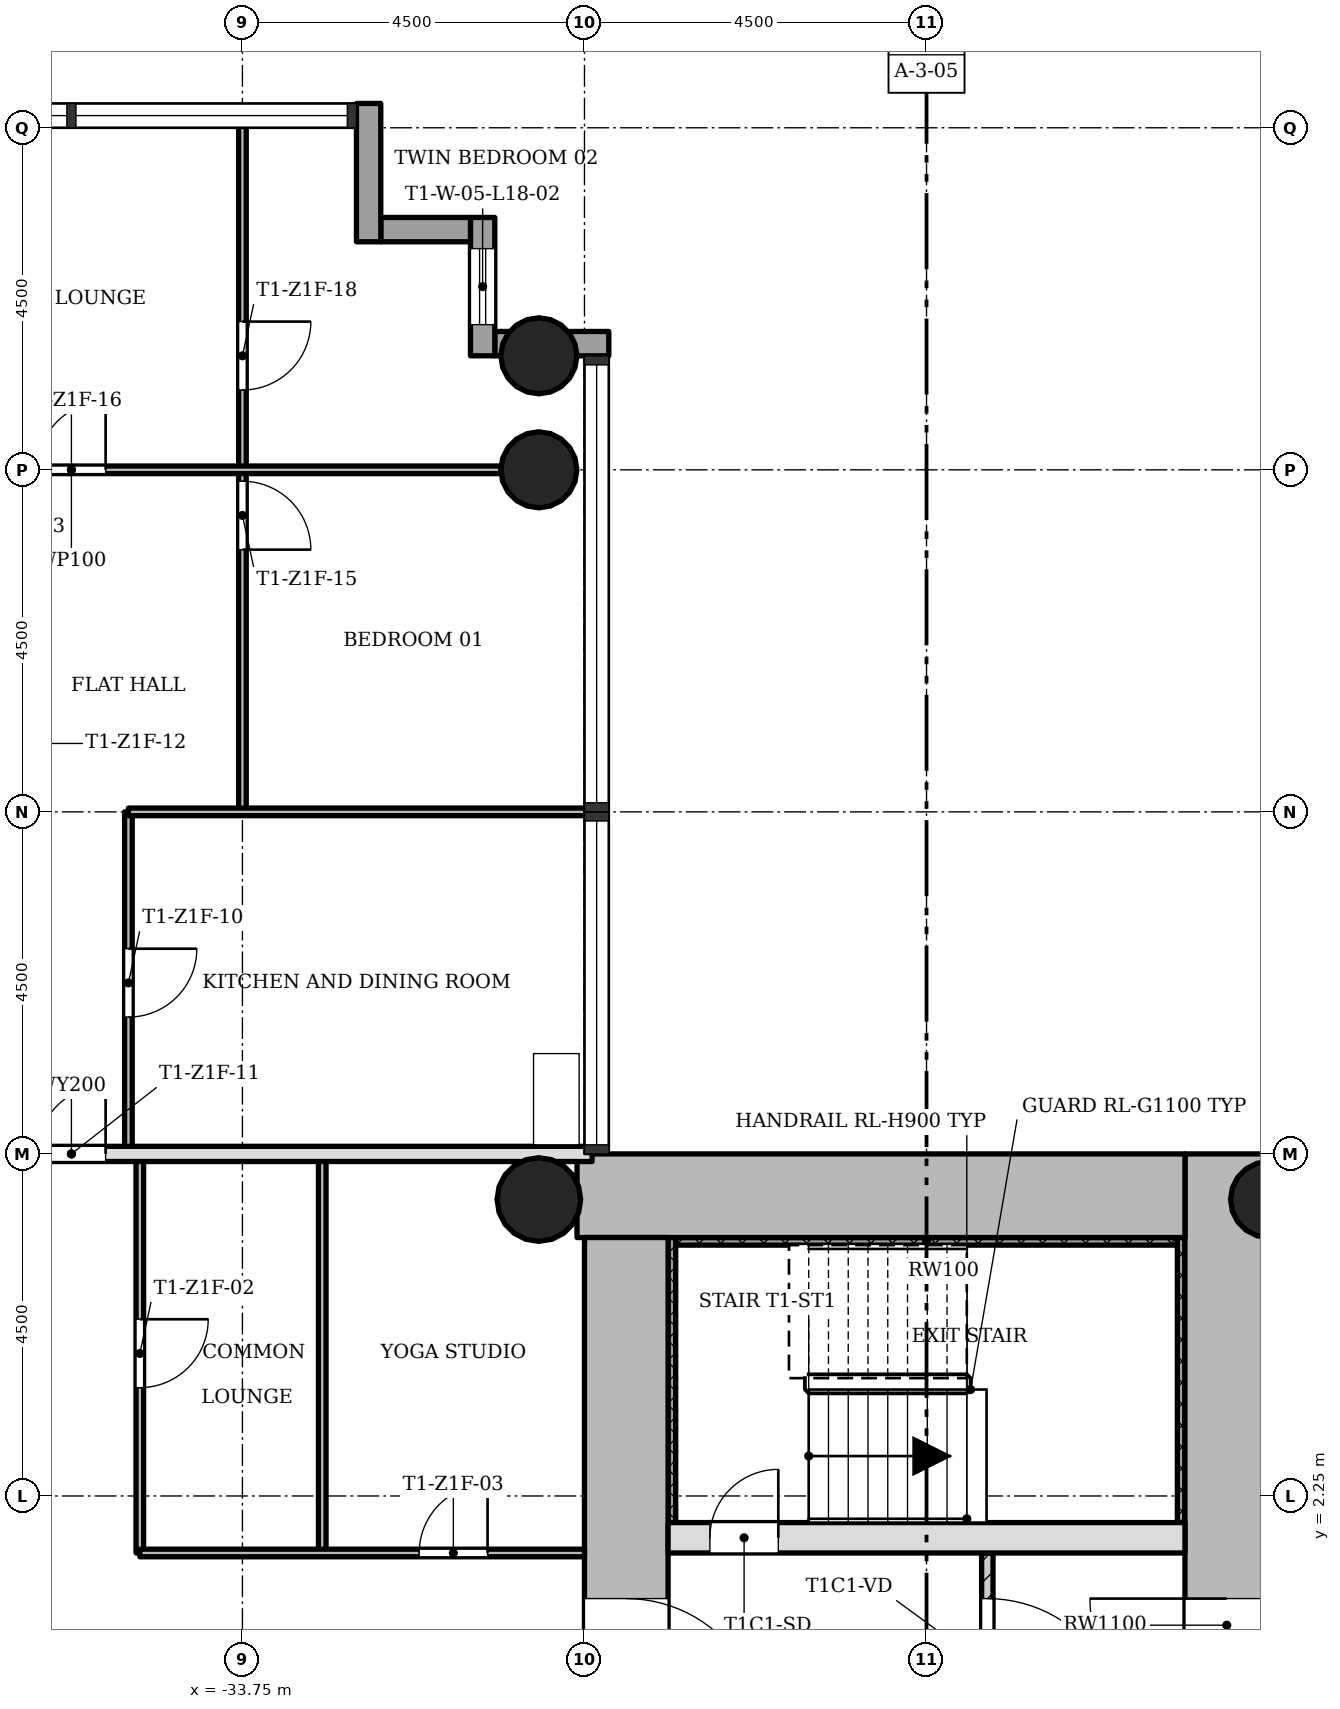
"""IFC4 building model, lengths in metres.
Left out: names, types, materials, properties, quantities, classifications, styles, units other than length and angle.
Written with IfcOpenShell. Run it as: python <this file> out.ifc"""

import sys

from ifc_helpers import new_model, si_unit, direction, frame, frame_2d, origin, origin_2d, place, context, subcontext, project, spatial, rectangle, hollow_circle, extrude, element, fill, save


model = new_model("IFC4")
c1 = context("Model", 3, precision=1e-05, world=origin(), true_north=direction((0.0, 1.0)))
c2 = subcontext(c1, "Body", "Model", "MODEL_VIEW")
j1 = project(units=[si_unit("LENGTHUNIT", "METRE"), si_unit("PLANEANGLEUNIT", "RADIAN")], contexts=[c1])
p1 = place(None, origin())
s1 = spatial("IfcSite", under=j1, at=p1, CompositionType="ELEMENT")
p2 = place(p1, origin())
s2 = spatial("IfcBuilding", under=s1, at=p2, CompositionType="ELEMENT")
p3 = place(p2, frame((0.0, 0.0, 68.7)))
s3 = spatial("IfcBuildingStorey", under=s2, at=p3, CompositionType="ELEMENT", Elevation=68.7)
p4 = place(p3, frame((-20.8, -5.65, 0.0), z_axis=(0.0, 0.0, 1.0), x_axis=(0.0, 1.0, 0.0)))
e1 = element("IfcWall", 1, at=p4, inside=s3, PredefinedType="SHEAR", context=c2, shape_type="SweptSolid", body=[
    extrude(rectangle(XDim=12.4, YDim=1.1, at=frame_2d((6.2, 0.0))), origin(), (0.0, 0.0, 1.0), 3.4),
])
p5 = place(p4, frame((4.75, 0.0, 0.0)))
e2 = element("IfcOpeningElement", 2, at=p5, cuts=e1, PredefinedType="OPENING", context=c2, shape_type="SweptSolid", body=[
    extrude(rectangle(XDim=1.8, YDim=2.1, at=frame_2d((0.9, 1.05))), frame((0.0, 0.56, 0.0), z_axis=(0.0, -1.0, 0.0), x_axis=(1.0, 0.0, 0.0)), (0.0, 0.0, 1.0), 1.12),
])
p6 = place(p3, frame((-21.35, 6.2, 0.0), z_axis=(0.0, 0.0, 1.0), x_axis=(-1.0, 0.0, 0.0)))
e3 = element("IfcWall", 3, at=p6, inside=s3, PredefinedType="SHEAR", context=c2, shape_type="SweptSolid", body=[
    extrude(rectangle(XDim=7.998, YDim=1.1, at=frame_2d((3.999, 0.0))), origin(), (0.0, 0.0, 1.0), 3.4),
])
p7 = place(p3, frame((-28.7, 5.65, 0.0), z_axis=(0.0, 0.0, 1.0), x_axis=(0.0, -1.0, 0.0)))
e4 = element("IfcWall", 4, at=p7, inside=s3, PredefinedType="SHEAR", context=c2, shape_type="SweptSolid", body=[
    extrude(rectangle(XDim=12.4, YDim=1.1, at=frame_2d((6.2, 0.0))), origin(), (0.0, 0.0, 1.0), 3.4),
])
p8 = place(p7, frame((4.75, 0.0, 0.0)))
e5 = element("IfcOpeningElement", 5, at=p8, cuts=e4, PredefinedType="OPENING", context=c2, shape_type="SweptSolid", body=[
    extrude(rectangle(XDim=1.8, YDim=2.1, at=frame_2d((0.9, 1.05))), frame((0.0, 0.56, 0.0), z_axis=(0.0, -1.0, 0.0), x_axis=(1.0, 0.0, 0.0)), (0.0, 0.0, 1.0), 1.12),
])
p9 = place(p3, frame((-28.15, 1.7, 0.0), z_axis=(0.0, 0.0, 1.0), x_axis=(1.0, 0.0, 0.0)))
e6 = element("IfcWall", 6, at=p9, inside=s3, PredefinedType="SHEAR", context=c2, shape_type="SweptSolid", body=[
    extrude(rectangle(XDim=6.8, YDim=0.4, at=frame_2d((3.4, 0.0))), origin(), (0.0, 0.0, 1.0), 3.4),
])
p10 = place(p9, frame((0.55, 0.0, 0.0)))
e7 = element("IfcOpeningElement", 7, at=p10, cuts=e6, PredefinedType="OPENING", context=c2, shape_type="SweptSolid", body=[
    extrude(rectangle(XDim=0.9, YDim=2.1, at=frame_2d((0.45, 1.05))), frame((0.0, 0.21, 0.0), z_axis=(0.0, -1.0, 0.0), x_axis=(1.0, 0.0, 0.0)), (0.0, 0.0, 1.0), 0.42),
])
for number, where, z_axis, x_axis in (
    (8, (-20.25, 6.15, 0.0), (0.0, 0.0, 1.0), (1.0, 0.0, 0.0)),
    (9, (-29.85, 15.75, 0.0), (0.0, 0.0, 1.0), (1.0, 0.0, 0.0)),
    (10, (-29.85, 17.25, 0.0), (0.0, 0.0, 1.0), (1.0, 0.0, 0.0)),
):
    element("IfcColumn", number, at=place(p3, frame(where, z_axis=z_axis, x_axis=x_axis)), inside=s3, PredefinedType="COLUMN", context=c2, shape_type="SweptSolid", body=[
        extrude(hollow_circle(Radius=0.5, WallThickness=0.036, at=origin_2d()), origin(), (0.0, 0.0, 1.0), 3.4),
    ])
p11 = place(p3, frame((-29.85, 6.15, 0.0), z_axis=(0.0, 0.0, 1.0), x_axis=(1.0, 0.0, 0.0)))
e11 = element("IfcColumn", 11, at=p11, inside=s3, PredefinedType="COLUMN", context=c2, shape_type="SweptSolid", body=[
    extrude(hollow_circle(Radius=0.55, WallThickness=0.04, at=origin_2d()), origin(), (0.0, 0.0, 1.0), 3.4),
])
p12 = place(p3, frame((-28.93, 17.41, -0.3), z_axis=(0.0, 0.0, 1.0), x_axis=(-1.0, 0.0, 0.0)))
e12 = element("IfcWall", 12, at=p12, inside=s3, PredefinedType="STANDARD", context=c2, shape_type="SweptSolid", body=[
    extrude(rectangle(XDim=1.5, YDim=0.32, at=frame_2d((0.75, 0.0))), origin(), (0.0, 0.0, 1.0), 3.4),
])
p13 = place(p3, frame((-30.59, 17.25, -0.3), z_axis=(0.0, 0.0, 1.0), x_axis=(0.0, 1.0, 0.0)))
e13 = element("IfcWall", 13, at=p13, inside=s3, PredefinedType="STANDARD", context=c2, shape_type="SweptSolid", body=[
    extrude(rectangle(XDim=1.82, YDim=0.32, at=frame_2d((0.91, 0.0))), origin(), (0.0, 0.0, 1.0), 3.4),
])
p14 = place(p13, frame((0.41, 0.0, 1.2)))
e14 = element("IfcOpeningElement", 14, at=p14, cuts=e13, PredefinedType="OPENING", context=c2, shape_type="SweptSolid", body=[
    extrude(rectangle(XDim=1.0, YDim=1.5, at=frame_2d((0.5, 0.75))), frame((0.0, 0.17, 0.0), z_axis=(0.0, -1.0, 0.0), x_axis=(1.0, 0.0, 0.0)), (0.0, 0.0, 1.0), 0.34),
])
p15 = place(p3, frame((-30.75, 18.91, -0.3), z_axis=(0.0, 0.0, 1.0), x_axis=(-1.0, 0.0, 0.0)))
e15 = element("IfcWall", 15, at=p15, inside=s3, PredefinedType="STANDARD", context=c2, shape_type="SweptSolid", body=[
    extrude(rectangle(XDim=1.18, YDim=0.32, at=frame_2d((0.59, 0.0))), origin(), (0.0, 0.0, 1.0), 3.4),
])
p16 = place(p3, frame((-32.09, 18.75, -0.3), z_axis=(0.0, 0.0, 1.0), x_axis=(0.0, 1.0, 0.0)))
e16 = element("IfcWall", 16, at=p16, inside=s3, PredefinedType="STANDARD", context=c2, shape_type="SweptSolid", body=[
    extrude(rectangle(XDim=1.82, YDim=0.32, at=frame_2d((0.91, 0.0))), origin(), (0.0, 0.0, 1.0), 3.4),
])
p17 = place(p3, frame((-23.95, -1.5, 0.0), z_axis=(0.0, 0.0, 1.0), x_axis=(0.0, 1.0, 0.0)))
e17 = element("IfcWall", 17, at=p17, inside=s3, PredefinedType="PARTITIONING", context=c2, shape_type="SweptSolid", body=[
    extrude(rectangle(XDim=3.0, YDim=0.15, at=frame_2d((1.5, 0.0))), origin(), (0.0, 0.0, 1.0), 3.0),
])
p18 = place(p17, frame((0.6, 0.0, 0.0)))
e18 = element("IfcOpeningElement", 18, at=p18, cuts=e17, PredefinedType="OPENING", context=c2, shape_type="SweptSolid", body=[
    extrude(rectangle(XDim=1.8, YDim=2.1, at=frame_2d((0.9, 1.05))), frame((0.0, 0.085, 0.0), z_axis=(0.0, -1.0, 0.0), x_axis=(1.0, 0.0, 0.0)), (0.0, 0.0, 1.0), 0.17),
])
p19 = place(p3, frame((-35.25, 6.75, 0.0), z_axis=(0.0, 0.0, 1.0), x_axis=(0.0, 1.0, 0.0)))
e19 = element("IfcWall", 19, at=p19, inside=s3, PredefinedType="PARTITIONING", context=c2, shape_type="SweptSolid", body=[
    extrude(rectangle(XDim=4.5, YDim=0.1, at=frame_2d((2.25, 0.0))), origin(), (0.0, 0.0, 1.0), 3.0),
])
p20 = place(p19, frame((1.8, 0.0, 0.0)))
e20 = element("IfcOpeningElement", 20, at=p20, cuts=e19, PredefinedType="OPENING", context=c2, shape_type="SweptSolid", body=[
    extrude(rectangle(XDim=0.9, YDim=2.1, at=frame_2d((0.45, 1.05))), frame((0.0, 0.06, 0.0), z_axis=(0.0, -1.0, 0.0), x_axis=(1.0, 0.0, 0.0)), (0.0, 0.0, 1.0), 0.12),
])
p21 = place(p3, frame((-35.1, 1.5, 0.0), z_axis=(0.0, 0.0, 1.0), x_axis=(0.0, 1.0, 0.0)))
e21 = element("IfcWall", 21, at=p21, inside=s3, PredefinedType="PARTITIONING", context=c2, shape_type="SweptSolid", body=[
    extrude(rectangle(XDim=5.25, YDim=0.1, at=frame_2d((2.625, 0.0))), origin(), (0.0, 0.0, 1.0), 3.0),
])
p22 = place(p21, frame((2.175, 0.0, 0.0)))
e22 = element("IfcOpeningElement", 22, at=p22, cuts=e21, PredefinedType="OPENING", context=c2, shape_type="SweptSolid", body=[
    extrude(rectangle(XDim=0.9, YDim=2.1, at=frame_2d((0.45, 1.05))), frame((0.0, 0.06, 0.0), z_axis=(0.0, -1.0, 0.0), x_axis=(1.0, 0.0, 0.0)), (0.0, 0.0, 1.0), 0.12),
])
p23 = place(p3, frame((-33.75, 11.25, 0.0), z_axis=(0.0, 0.0, 1.0), x_axis=(0.0, 1.0, 0.0)))
e23 = element("IfcWall", 23, at=p23, inside=s3, PredefinedType="PARTITIONING", context=c2, shape_type="SweptSolid", body=[
    extrude(rectangle(XDim=9.1, YDim=0.1, at=frame_2d((4.55, 0.0))), origin(), (0.0, 0.0, 1.0), 3.0),
])
p24 = place(p23, frame((3.45, 0.0, 0.0)))
e24 = element("IfcOpeningElement", 24, at=p24, cuts=e23, PredefinedType="OPENING", context=c2, shape_type="SweptSolid", body=[
    extrude(rectangle(XDim=0.9, YDim=2.1, at=frame_2d((0.45, 1.05))), frame((0.0, 0.06, 0.0), z_axis=(0.0, -1.0, 0.0), x_axis=(1.0, 0.0, 0.0)), (0.0, 0.0, 1.0), 0.12),
])
p25 = place(p23, frame((5.55, 0.0, 0.0)))
e25 = element("IfcOpeningElement", 25, at=p25, cuts=e23, PredefinedType="OPENING", context=c2, shape_type="SweptSolid", body=[
    extrude(rectangle(XDim=0.9, YDim=2.1, at=frame_2d((0.45, 1.05))), frame((0.0, 0.06, 0.0), z_axis=(0.0, -1.0, 0.0), x_axis=(1.0, 0.0, 0.0)), (0.0, 0.0, 1.0), 0.12),
])
p26 = place(p3, frame((-32.7, 1.5, 0.0), z_axis=(0.0, 0.0, 1.0), x_axis=(0.0, 1.0, 0.0)))
e26 = element("IfcWall", 26, at=p26, inside=s3, PredefinedType="PARTITIONING", context=c2, shape_type="SweptSolid", body=[
    extrude(rectangle(XDim=5.25, YDim=0.1, at=frame_2d((2.625, 0.0))), origin(), (0.0, 0.0, 1.0), 3.0),
])
p27 = place(p3, frame((-35.1, 1.5, 0.0), z_axis=(0.0, 0.0, 1.0), x_axis=(1.0, 0.0, 0.0)))
e27 = element("IfcWall", 27, at=p27, inside=s3, PredefinedType="PARTITIONING", context=c2, shape_type="SweptSolid", body=[
    extrude(rectangle(XDim=5.85, YDim=0.1, at=frame_2d((2.925, 0.0))), origin(), (0.0, 0.0, 1.0), 3.0),
])
p28 = place(p27, frame((3.675, 0.0, 0.0)))
e28 = element("IfcOpeningElement", 28, at=p28, cuts=e27, PredefinedType="OPENING", context=c2, shape_type="SweptSolid", body=[
    extrude(rectangle(XDim=0.9, YDim=2.1, at=frame_2d((0.45, 1.05))), frame((0.0, 0.06, 0.0), z_axis=(0.0, -1.0, 0.0), x_axis=(1.0, 0.0, 0.0)), (0.0, 0.0, 1.0), 0.12),
])
p29 = place(p3, frame((-42.85, 6.75, 0.0), z_axis=(0.0, 0.0, 1.0), x_axis=(1.0, 0.0, 0.0)))
e29 = element("IfcWall", 29, at=p29, inside=s3, PredefinedType="SOLIDWALL", context=c2, shape_type="SweptSolid", body=[
    extrude(rectangle(XDim=13.7, YDim=0.2, at=frame_2d((6.85, 0.0))), origin(), (0.0, 0.0, 1.0), 3.0),
])
p30 = place(p29, frame((6.4, 0.0, 0.0)))
e30 = element("IfcOpeningElement", 30, at=p30, cuts=e29, PredefinedType="OPENING", context=c2, shape_type="SweptSolid", body=[
    extrude(rectangle(XDim=0.9, YDim=2.1, at=frame_2d((0.45, 1.05))), frame((0.0, 0.11, 0.0), z_axis=(0.0, -1.0, 0.0), x_axis=(1.0, 0.0, 0.0)), (0.0, 0.0, 1.0), 0.22),
])
p31 = place(p3, frame((-35.25, 11.25, 0.0), z_axis=(0.0, 0.0, 1.0), x_axis=(1.0, 0.0, 0.0)))
e31 = element("IfcWall", 31, at=p31, inside=s3, PredefinedType="PARTITIONING", context=c2, shape_type="SweptSolid", body=[
    extrude(rectangle(XDim=6.1, YDim=0.1, at=frame_2d((3.05, 0.0))), origin(), (0.0, 0.0, 1.0), 3.0),
])
p32 = place(p3, frame((-41.65, 15.75, 0.0), z_axis=(0.0, 0.0, 1.0), x_axis=(1.0, 0.0, 0.0)))
e32 = element("IfcWall", 32, at=p32, inside=s3, PredefinedType="PARTITIONING", context=c2, shape_type="SweptSolid", body=[
    extrude(rectangle(XDim=11.3, YDim=0.1, at=frame_2d((5.65, 0.0))), origin(), (0.0, 0.0, 1.0), 3.0),
])
p33 = place(p32, frame((5.2, 0.0, 0.0)))
e33 = element("IfcOpeningElement", 33, at=p33, cuts=e32, PredefinedType="OPENING", context=c2, shape_type="SweptSolid", body=[
    extrude(rectangle(XDim=0.9, YDim=2.1, at=frame_2d((0.45, 1.05))), frame((0.0, 0.06, 0.0), z_axis=(0.0, -1.0, 0.0), x_axis=(1.0, 0.0, 0.0)), (0.0, 0.0, 1.0), 0.12),
])
p34 = place(p3, frame((-21.4, 1.9, 0.0), z_axis=(0.0, 0.0, 1.0), x_axis=(0.0, 1.0, 0.0)))
e34 = element("IfcWall", 34, at=p34, inside=s3, PredefinedType="SHEAR", context=c2, shape_type="SweptSolid", body=[
    extrude(rectangle(XDim=3.75, YDim=0.1, at=frame_2d((1.875, 0.0))), origin(), (0.0, 0.0, 1.0), 3.4),
])
p35 = place(p3, frame((-28.05, 5.6, 0.0), z_axis=(0.0, 0.0, 1.0), x_axis=(1.0, 0.0, 0.0)))
e35 = element("IfcWall", 35, at=p35, inside=s3, PredefinedType="SHEAR", context=c2, shape_type="SweptSolid", body=[
    extrude(rectangle(XDim=6.6, YDim=0.1, at=frame_2d((3.3, 0.0))), origin(), (0.0, 0.0, 1.0), 3.4),
])
p36 = place(p3, frame((-28.1, 1.9, 0.0), z_axis=(0.0, 0.0, 1.0), x_axis=(0.0, 1.0, 0.0)))
e36 = element("IfcWall", 36, at=p36, inside=s3, PredefinedType="SHEAR", context=c2, shape_type="SweptSolid", body=[
    extrude(rectangle(XDim=3.75, YDim=0.1, at=frame_2d((1.875, 0.0))), origin(), (0.0, 0.0, 1.0), 3.4),
])
p37 = place(p18, origin())
e37 = element("IfcDoor", 37, at=p37, inside=s3, OperationType="SINGLE_SWING_LEFT", PredefinedType="DOOR", context=c2, shape_type="SweptSolid", body=[
    extrude(rectangle(XDim=1.8, YDim=2.1, at=frame_2d((0.9, 1.05))), frame((0.0, 0.025, 0.0), z_axis=(0.0, -1.0, 0.0), x_axis=(1.0, 0.0, 0.0)), (0.0, 0.0, 1.0), 0.05),
])
fill(e18, e37)
p38 = place(p22, origin())
e38 = element("IfcDoor", 38, at=p38, inside=s3, OperationType="SINGLE_SWING_RIGHT", PredefinedType="DOOR", context=c2, shape_type="SweptSolid", body=[
    extrude(rectangle(XDim=0.9, YDim=2.1, at=frame_2d((0.45, 1.05))), frame((0.0, 0.025, 0.0), z_axis=(0.0, -1.0, 0.0), x_axis=(1.0, 0.0, 0.0)), (0.0, 0.0, 1.0), 0.05),
])
fill(e22, e38)
p39 = place(p28, origin())
e39 = element("IfcDoor", 39, at=p39, inside=s3, OperationType="SINGLE_SWING_LEFT", PredefinedType="DOOR", context=c2, shape_type="SweptSolid", body=[
    extrude(rectangle(XDim=0.9, YDim=2.1, at=frame_2d((0.45, 1.05))), frame((0.0, 0.025, 0.0), z_axis=(0.0, -1.0, 0.0), x_axis=(1.0, 0.0, 0.0)), (0.0, 0.0, 1.0), 0.05),
])
fill(e28, e39)
p40 = place(p20, origin())
e40 = element("IfcDoor", 40, at=p40, inside=s3, OperationType="SINGLE_SWING_RIGHT", PredefinedType="DOOR", context=c2, shape_type="SweptSolid", body=[
    extrude(rectangle(XDim=0.9, YDim=2.1, at=frame_2d((0.45, 1.05))), frame((0.0, 0.025, 0.0), z_axis=(0.0, -1.0, 0.0), x_axis=(1.0, 0.0, 0.0)), (0.0, 0.0, 1.0), 0.05),
])
fill(e20, e40)
p41 = place(p30, origin())
e41 = element("IfcDoor", 41, at=p41, inside=s3, OperationType="SINGLE_SWING_LEFT", PredefinedType="DOOR", context=c2, shape_type="SweptSolid", body=[
    extrude(rectangle(XDim=0.9, YDim=2.1, at=frame_2d((0.45, 1.05))), frame((0.0, 0.025, 0.0), z_axis=(0.0, -1.0, 0.0), x_axis=(1.0, 0.0, 0.0)), (0.0, 0.0, 1.0), 0.05),
])
fill(e30, e41)
p42 = place(p24, origin())
e42 = element("IfcDoor", 42, at=p42, inside=s3, OperationType="SINGLE_SWING_LEFT", PredefinedType="DOOR", context=c2, shape_type="SweptSolid", body=[
    extrude(rectangle(XDim=0.9, YDim=2.1, at=frame_2d((0.45, 1.05))), frame((0.0, 0.025, 0.0), z_axis=(0.0, -1.0, 0.0), x_axis=(1.0, 0.0, 0.0)), (0.0, 0.0, 1.0), 0.05),
])
fill(e24, e42)
p43 = place(p33, origin())
e43 = element("IfcDoor", 43, at=p43, inside=s3, OperationType="SINGLE_SWING_LEFT", PredefinedType="DOOR", context=c2, shape_type="SweptSolid", body=[
    extrude(rectangle(XDim=0.9, YDim=2.1, at=frame_2d((0.45, 1.05))), frame((0.0, 0.025, 0.0), z_axis=(0.0, -1.0, 0.0), x_axis=(1.0, 0.0, 0.0)), (0.0, 0.0, 1.0), 0.05),
])
fill(e33, e43)
p44 = place(p25, origin())
e44 = element("IfcDoor", 44, at=p44, inside=s3, OperationType="SINGLE_SWING_RIGHT", PredefinedType="DOOR", context=c2, shape_type="SweptSolid", body=[
    extrude(rectangle(XDim=0.9, YDim=2.1, at=frame_2d((0.45, 1.05))), frame((0.0, 0.025, 0.0), z_axis=(0.0, -1.0, 0.0), x_axis=(1.0, 0.0, 0.0)), (0.0, 0.0, 1.0), 0.05),
])
fill(e25, e44)
p45 = place(p10, origin())
e45 = element("IfcDoor", 45, at=p45, inside=s3, OperationType="SINGLE_SWING_LEFT", PredefinedType="DOOR", context=c2, shape_type="SweptSolid", body=[
    extrude(rectangle(XDim=0.9, YDim=2.1, at=frame_2d((0.45, 1.05))), frame((0.0, 0.025, 0.0), z_axis=(0.0, -1.0, 0.0), x_axis=(1.0, 0.0, 0.0)), (0.0, 0.0, 1.0), 0.05),
])
fill(e7, e45)
p46 = place(p8, origin())
e46 = element("IfcDoor", 46, at=p46, inside=s3, OperationType="SINGLE_SWING_LEFT", PredefinedType="DOOR", context=c2, shape_type="SweptSolid", body=[
    extrude(rectangle(XDim=1.8, YDim=2.1, at=frame_2d((0.9, 1.05))), frame((0.0, 0.025, 0.0), z_axis=(0.0, -1.0, 0.0), x_axis=(1.0, 0.0, 0.0)), (0.0, 0.0, 1.0), 0.05),
])
fill(e5, e46)
p47 = place(p5, origin())
e47 = element("IfcDoor", 47, at=p47, inside=s3, OperationType="SINGLE_SWING_LEFT", PredefinedType="DOOR", context=c2, shape_type="SweptSolid", body=[
    extrude(rectangle(XDim=1.8, YDim=2.1, at=frame_2d((0.9, 1.05))), frame((0.0, 0.025, 0.0), z_axis=(0.0, -1.0, 0.0), x_axis=(1.0, 0.0, 0.0)), (0.0, 0.0, 1.0), 0.05),
])
fill(e2, e47)
p48 = place(p14, origin())
e48 = element("IfcWindow", 48, at=p48, inside=s3, PartitioningType="SINGLE_PANEL", PredefinedType="WINDOW", context=c2, shape_type="SweptSolid", body=[
    extrude(rectangle(XDim=1.0, YDim=1.5, at=frame_2d((0.5, 0.75))), frame((0.0, 0.03, 0.0), z_axis=(0.0, -1.0, 0.0), x_axis=(1.0, 0.0, 0.0)), (0.0, 0.0, 1.0), 0.06),
])
fill(e14, e48)
save(model, sys.argv[1])
